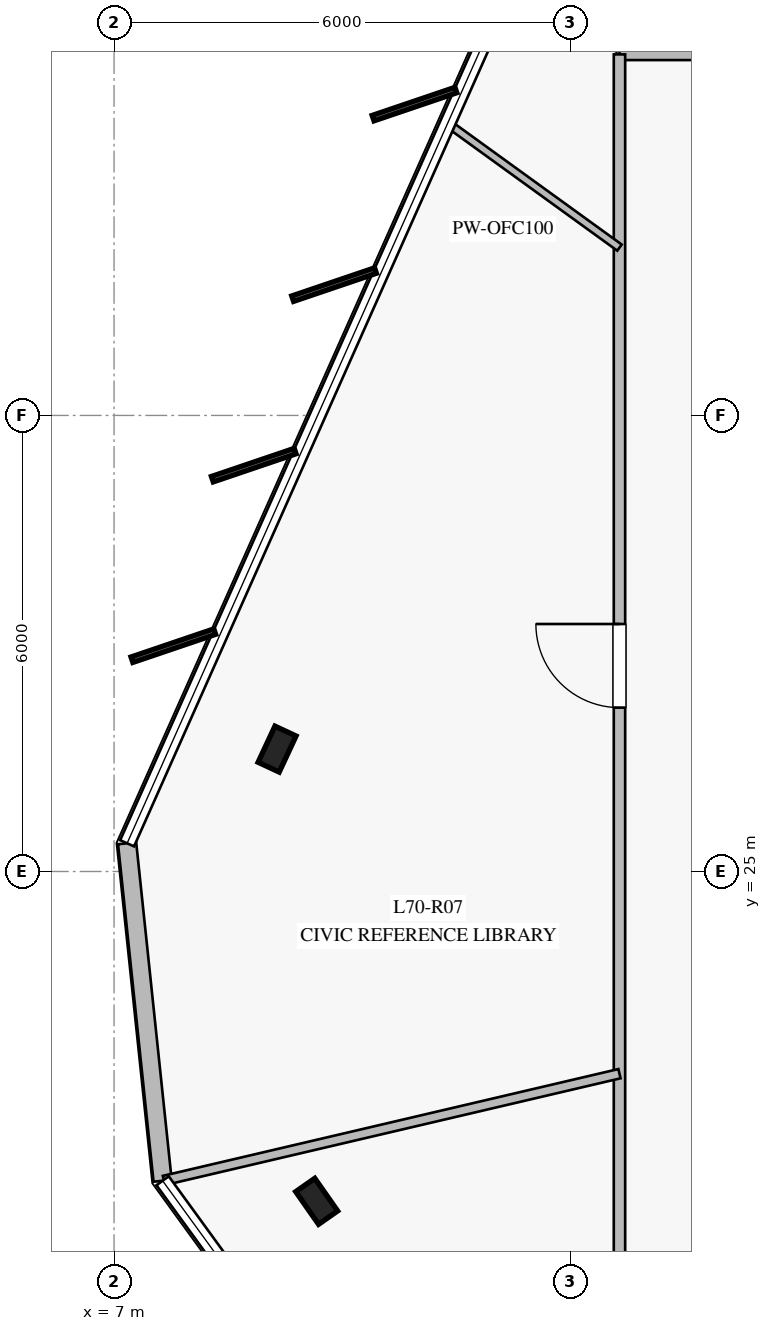
"""IFC4 building model, lengths in metres.
Left out: names, types, materials, properties, quantities, classifications, styles, units other than length and angle.
Written with IfcOpenShell. Run it as: python <this file> out.ifc"""

import sys

from ifc_helpers import new_model, si_unit, direction, frame, frame_2d, origin, origin_2d, place, context, subcontext, project, spatial, rectangle, i_section, extrude, element, fill, save


model = new_model("IFC4")
c1 = context("Model", 3, precision=1e-05, world=origin(), true_north=direction((0.0, 1.0)))
c2 = subcontext(c1, "Body", "Model", "MODEL_VIEW")
j1 = project(units=[si_unit("LENGTHUNIT", "METRE"), si_unit("PLANEANGLEUNIT", "RADIAN")], contexts=[c1])
p1 = place(None, origin())
s1 = spatial("IfcSite", under=j1, at=p1, CompositionType="ELEMENT")
p2 = place(p1, origin())
s2 = spatial("IfcBuilding", under=s1, at=p2, CompositionType="ELEMENT")
p3 = place(p2, frame((0.0, 0.0, 290.2)))
s3 = spatial("IfcBuildingStorey", under=s2, at=p3, CompositionType="ELEMENT", Elevation=290.2)
for number, where, z_axis, x_axis in (
    (1, (9.145, 26.61, 0.0), (0.0, 0.0, 1.0), (0.423, 0.906, 0.0)),
    (2, (9.666, 20.661, 0.0), (0.0, 0.0, 1.0), (-0.574, 0.819, 0.0)),
):
    element("IfcColumn", number, at=place(p3, frame(where, z_axis=z_axis, x_axis=x_axis)), inside=s3, PredefinedType="COLUMN", context=c2, shape_type="SweptSolid", body=[
        extrude(i_section(OverallWidth=0.306, OverallDepth=0.524, WebThickness=0.021, FlangeThickness=0.04, at=origin_2d()), origin(), (0.0, 0.0, 1.0), 4.0),
    ])
p4 = place(p3, frame((7.172, 25.371, 0.0), z_axis=(0.0, 0.0, 1.0), x_axis=(0.104553844109, -0.994519227407, 0.0)))
e3 = element("IfcWall", 3, at=p4, inside=s3, PredefinedType="STANDARD", context=c2, shape_type="SweptSolid", body=[
    extrude(rectangle(XDim=4.465, YDim=0.24, at=frame_2d((2.232, 0.0))), origin(), (0.0, 0.0, 1.0), 3.78),
])
p5 = place(p3, frame((13.65, 35.75, 0.0), z_axis=(0.0, 0.0, 1.0), x_axis=(1.0, 0.0, 0.0)))
e4 = element("IfcWall", 4, at=p5, inside=s3, PredefinedType="PARTITIONING", context=c2, shape_type="SweptSolid", body=[
    extrude(rectangle(XDim=22.7, YDim=0.15, at=frame_2d((11.35, 0.0))), origin(), (0.0, 0.0, 1.0), 3.28),
])
p6 = place(p5, frame((14.356, 0.0, 0.0)))
e5 = element("IfcOpeningElement", 5, at=p6, cuts=e4, PredefinedType="OPENING", context=c2, shape_type="SweptSolid", body=[
    extrude(rectangle(XDim=1.1, YDim=2.2, at=frame_2d((0.55, 1.1))), frame((0.0, 0.085, 0.0), z_axis=(0.0, -1.0, 0.0), x_axis=(1.0, 0.0, 0.0)), (0.0, 0.0, 1.0), 0.17),
])
p7 = place(p5, frame((3.871, 0.0, 0.0)))
e6 = element("IfcOpeningElement", 6, at=p7, cuts=e4, PredefinedType="OPENING", context=c2, shape_type="SweptSolid", body=[
    extrude(rectangle(XDim=1.1, YDim=2.2, at=frame_2d((0.55, 1.1))), frame((0.0, 0.085, 0.0), z_axis=(0.0, -1.0, 0.0), x_axis=(1.0, 0.0, 0.0)), (0.0, 0.0, 1.0), 0.17),
])
p8 = place(p3, frame((13.65, 14.25, 0.0), z_axis=(0.0, 0.0, 1.0), x_axis=(0.0, 1.0, 0.0)))
e7 = element("IfcWall", 7, at=p8, inside=s3, PredefinedType="PARTITIONING", context=c2, shape_type="SweptSolid", body=[
    extrude(rectangle(XDim=21.5, YDim=0.15, at=frame_2d((10.75, 0.0))), origin(), (0.0, 0.0, 1.0), 3.05),
])
p9 = place(p8, frame((12.906, 0.0, 0.0)))
e8 = element("IfcOpeningElement", 8, at=p9, cuts=e7, PredefinedType="OPENING", context=c2, shape_type="SweptSolid", body=[
    extrude(rectangle(XDim=1.1, YDim=2.2, at=frame_2d((0.55, 1.1))), frame((0.0, 0.085, 0.0), z_axis=(0.0, -1.0, 0.0), x_axis=(1.0, 0.0, 0.0)), (0.0, 0.0, 1.0), 0.17),
])
p10 = place(p3, frame((13.65, 33.208, 0.0), z_axis=(0.0, 0.0, 1.0), x_axis=(-0.810240415725, 0.586097661424, 0.0)))
e9 = element("IfcWall", 9, at=p10, inside=s3, PredefinedType="MOVABLE", context=c2, shape_type="SweptSolid", body=[
    extrude(rectangle(XDim=2.774, YDim=0.1, at=frame_2d((1.387, 0.0))), origin(), (0.0, 0.0, 1.0), 3.28),
])
p11 = place(p3, frame((13.65, 22.34, 0.0), z_axis=(0.0, 0.0, 1.0), x_axis=(-0.973608738479, -0.228223627956, 0.0)))
e10 = element("IfcWall", 10, at=p11, inside=s3, PredefinedType="PARTITIONING", context=c2, shape_type="SweptSolid", body=[
    extrude(rectangle(XDim=6.156, YDim=0.125, at=frame_2d((3.078, 0.0))), origin(), (0.0, 0.0, 1.0), 3.28),
])
p12 = place(p9, origin())
e11 = element("IfcDoor", 11, at=p12, inside=s3, OperationType="SINGLE_SWING_RIGHT", PredefinedType="DOOR", context=c2, shape_type="SweptSolid", body=[
    extrude(rectangle(XDim=1.1, YDim=2.2, at=frame_2d((0.55, 1.1))), frame((0.0, 0.025, 0.0), z_axis=(0.0, -1.0, 0.0), x_axis=(1.0, 0.0, 0.0)), (0.0, 0.0, 1.0), 0.05),
])
fill(e8, e11)
save(model, sys.argv[1])
